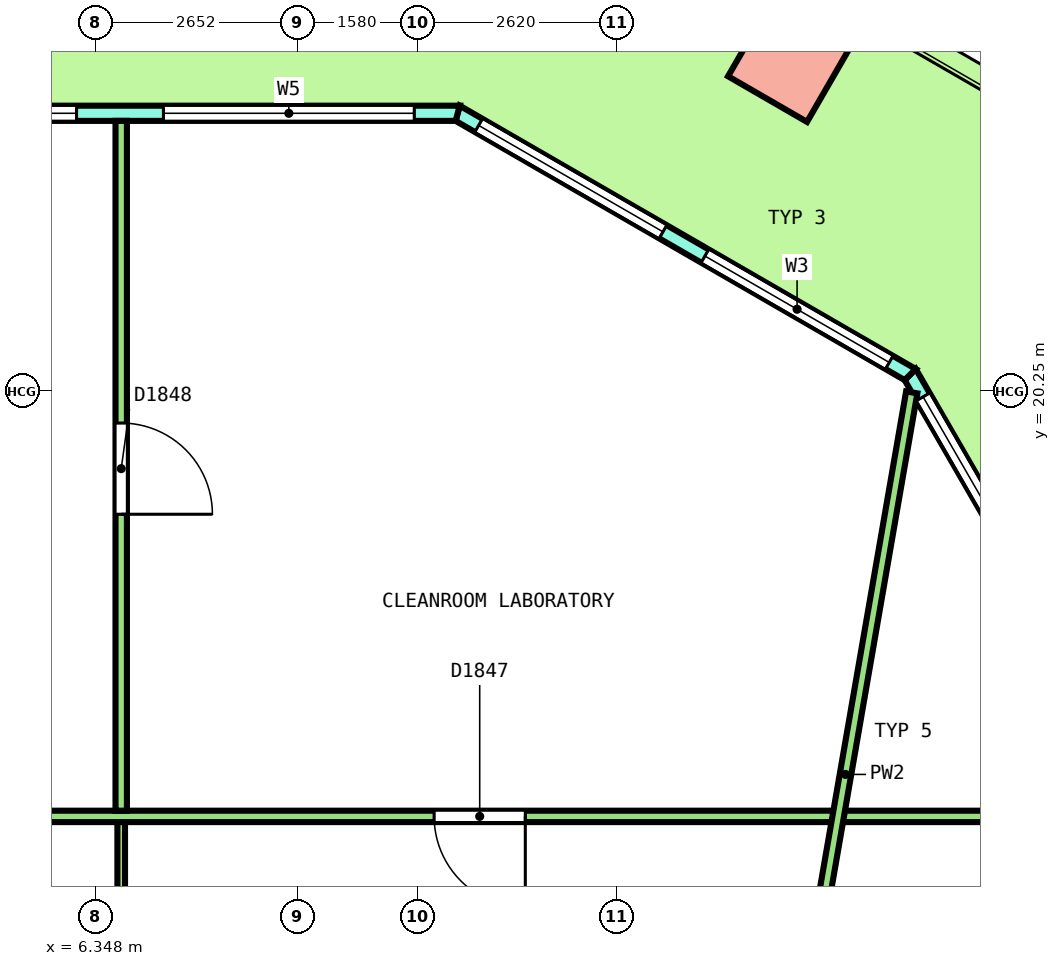
"""IFC4 building model, lengths in metres.
Left out: names, types, materials, properties, quantities, classifications, styles, units other than length and angle.
Written with IfcOpenShell. Run it as: python <this file> out.ifc"""

import sys

from ifc_helpers import new_model, si_unit, direction, frame, frame_2d, origin, origin_2d, place, context, subcontext, project, spatial, polyline, rectangle, outline, extrude, element, fill, save


model = new_model("IFC4")
c1 = context("Model", 3, precision=1e-05, world=origin(), true_north=direction((0.0, 1.0)))
c2 = subcontext(c1, "Body", "Model", "MODEL_VIEW")
j1 = project(units=[si_unit("LENGTHUNIT", "METRE"), si_unit("PLANEANGLEUNIT", "RADIAN")], contexts=[c1])
p1 = place(None, origin())
s1 = spatial("IfcSite", under=j1, at=p1, CompositionType="ELEMENT")
p2 = place(p1, origin())
s2 = spatial("IfcBuilding", under=s1, at=p2, CompositionType="ELEMENT")
p3 = place(p2, frame((0.0, 0.0, 180.4)))
s3 = spatial("IfcBuildingStorey", under=s2, at=p3, CompositionType="ELEMENT", Elevation=180.4)
p4 = place(p3, frame((15.484, 24.606, 0.0), z_axis=(0.036265236264, 0.0, 0.999342199969), x_axis=(-0.865313546461, 0.500246354177, 0.031401456084)))
e1 = element("IfcColumn", 1, at=p4, inside=s3, PredefinedType="COLUMN", context=c2, shape_type="SweptSolid", body=[
    extrude(rectangle(XDim=1.2, YDim=1.2, at=origin_2d()), origin(), (0.0, 0.0, 1.0), 4.053),
])
p5 = place(p3, frame((26.251, 4.543, 0.0), z_axis=(0.0, 0.0, 1.0), x_axis=(-0.499998761798, 0.866026118659, 0.0)))
e2 = element("IfcWall", 2, at=p5, inside=s3, PredefinedType="SOLIDWALL", context=c2, shape_type="SweptSolid", body=[
    extrude(outline(polyline([(-0.027, -0.1), (0.997, -0.1), (2.021, -0.1), (3.046, -0.1), (4.07, -0.1), (5.094, -0.1), (6.118, -0.1), (7.143, -0.1), (8.167, -0.1), (9.191, -0.1), (10.215, -0.1), (11.239, -0.1), (12.263, -0.1), (13.288, -0.1), (14.312, -0.1), (15.336, -0.1), (16.36, -0.1), (17.385, -0.1), (18.409, -0.1), (18.355, 0.1), (17.337, 0.1), (16.319, 0.1), (15.3, 0.1), (14.282, 0.1), (13.264, 0.1), (12.246, 0.1), (11.227, 0.1), (10.209, 0.1), (9.191, 0.1), (8.173, 0.1), (7.155, 0.1), (6.136, 0.1), (5.118, 0.1), (4.1, 0.1), (3.082, 0.1), (2.063, 0.1), (1.045, 0.1), (0.027, 0.1), (-0.027, -0.1)])), origin(), (0.0, 0.0, 1.0), 4.1),
])
p6 = place(p5, frame((0.338, 0.0, 0.1)))
e3 = element("IfcOpeningElement", 3, at=p6, cuts=e2, PredefinedType="OPENING", context=c2, shape_type="SweptSolid", body=[
    extrude(rectangle(XDim=3.0, YDim=2.9, at=frame_2d((1.5, 1.45))), frame((0.0, 0.11, 0.0), z_axis=(0.0, -1.0, 0.0), x_axis=(1.0, 0.0, 0.0)), (0.0, 0.0, 1.0), 0.22),
])
p7 = place(p5, frame((4.015, 0.0, 0.1)))
e4 = element("IfcOpeningElement", 4, at=p7, cuts=e2, PredefinedType="OPENING", context=c2, shape_type="SweptSolid", body=[
    extrude(rectangle(XDim=3.0, YDim=2.9, at=frame_2d((1.5, 1.45))), frame((0.0, 0.11, 0.0), z_axis=(0.0, -1.0, 0.0), x_axis=(1.0, 0.0, 0.0)), (0.0, 0.0, 1.0), 0.22),
])
p8 = place(p5, frame((8.291, 0.0, 0.0)))
e5 = element("IfcOpeningElement", 5, at=p8, cuts=e2, PredefinedType="OPENING", context=c2, shape_type="SweptSolid", body=[
    extrude(rectangle(XDim=1.8, YDim=2.4, at=frame_2d((0.9, 1.2))), frame((0.0, 0.11, 0.0), z_axis=(0.0, -1.0, 0.0), x_axis=(1.0, 0.0, 0.0)), (0.0, 0.0, 1.0), 0.22),
])
p9 = place(p5, frame((8.291, 0.0, 2.55)))
e6 = element("IfcOpeningElement", 6, at=p9, cuts=e2, PredefinedType="OPENING", context=c2, shape_type="SweptSolid", body=[
    extrude(rectangle(XDim=1.8, YDim=0.45, at=frame_2d((0.9, 0.225))), frame((0.0, 0.11, 0.0), z_axis=(0.0, -1.0, 0.0), x_axis=(1.0, 0.0, 0.0)), (0.0, 0.0, 1.0), 0.22),
])
p10 = place(p5, frame((11.367, 0.0, 0.1)))
e7 = element("IfcOpeningElement", 7, at=p10, cuts=e2, PredefinedType="OPENING", context=c2, shape_type="SweptSolid", body=[
    extrude(rectangle(XDim=3.0, YDim=2.9, at=frame_2d((1.5, 1.45))), frame((0.0, 0.11, 0.0), z_axis=(0.0, -1.0, 0.0), x_axis=(1.0, 0.0, 0.0)), (0.0, 0.0, 1.0), 0.22),
])
p11 = place(p5, frame((15.044, 0.0, 0.1)))
e8 = element("IfcOpeningElement", 8, at=p11, cuts=e2, PredefinedType="OPENING", context=c2, shape_type="SweptSolid", body=[
    extrude(rectangle(XDim=3.0, YDim=2.9, at=frame_2d((1.5, 1.45))), frame((0.0, 0.11, 0.0), z_axis=(0.0, -1.0, 0.0), x_axis=(1.0, 0.0, 0.0)), (0.0, 0.0, 1.0), 0.22),
])
p12 = place(p3, frame((17.061, 20.463, 0.0), z_axis=(0.0, 0.0, 1.0), x_axis=(-0.866029458321, 0.49999297727, 0.0)))
e9 = element("IfcWall", 9, at=p12, inside=s3, PredefinedType="SOLIDWALL", context=c2, shape_type="SweptSolid", body=[
    extrude(outline(polyline([(-0.027, -0.1), (1.128, -0.1), (2.282, -0.1), (3.437, -0.1), (4.592, -0.1), (5.747, -0.1), (6.901, -0.1), (6.848, 0.1), (5.711, 0.1), (4.574, 0.1), (3.437, 0.1), (2.301, 0.1), (1.164, 0.1), (0.027, 0.1), (-0.027, -0.1)])), origin(), (0.0, 0.0, 1.0), 4.1),
])
p13 = place(p12, frame((0.319, 0.0, 0.1)))
e10 = element("IfcOpeningElement", 10, at=p13, cuts=e9, PredefinedType="OPENING", context=c2, shape_type="SweptSolid", body=[
    extrude(rectangle(XDim=2.8, YDim=2.9, at=frame_2d((1.4, 1.45))), frame((0.0, 0.11, 0.0), z_axis=(0.0, -1.0, 0.0), x_axis=(1.0, 0.0, 0.0)), (0.0, 0.0, 1.0), 0.22),
])
p14 = place(p12, frame((3.756, 0.0, 0.1)))
e11 = element("IfcOpeningElement", 11, at=p14, cuts=e9, PredefinedType="OPENING", context=c2, shape_type="SweptSolid", body=[
    extrude(rectangle(XDim=2.8, YDim=2.9, at=frame_2d((1.4, 1.45))), frame((0.0, 0.11, 0.0), z_axis=(0.0, -1.0, 0.0), x_axis=(1.0, 0.0, 0.0)), (0.0, 0.0, 1.0), 0.22),
])
p15 = place(p3, frame((11.107, 23.9, 0.0), z_axis=(0.0, 0.0, 1.0), x_axis=(-1.0, 0.0, 0.0)))
e12 = element("IfcWall", 12, at=p15, inside=s3, PredefinedType="SOLIDWALL", context=c2, shape_type="SweptSolid", body=[
    extrude(outline(polyline([(-0.027, -0.1), (0.985, -0.1), (1.998, -0.1), (3.01, -0.1), (4.022, -0.1), (5.034, -0.1), (6.046, -0.1), (7.058, -0.1), (8.071, -0.1), (9.083, -0.1), (10.095, -0.1), (11.107, -0.1), (12.119, -0.1), (13.131, -0.1), (14.143, -0.1), (15.156, -0.1), (16.168, -0.1), (17.18, -0.1), (18.192, -0.1), (19.204, -0.1), (20.216, -0.1), (21.229, -0.1), (22.241, -0.1), (22.187, 0.1), (21.18, 0.1), (20.172, 0.1), (19.165, 0.1), (18.158, 0.1), (17.151, 0.1), (16.143, 0.1), (15.136, 0.1), (14.129, 0.1), (13.122, 0.1), (12.114, 0.1), (11.107, 0.1), (10.1, 0.1), (9.092, 0.1), (8.085, 0.1), (7.078, 0.1), (6.071, 0.1), (5.063, 0.1), (4.056, 0.1), (3.049, 0.1), (2.042, 0.1), (1.034, 0.1), (0.027, 0.1), (-0.027, -0.1)])), origin(), (0.0, 0.0, 1.0), 4.1),
])
p16 = place(p15, frame((0.571, 0.0, 0.1)))
e13 = element("IfcOpeningElement", 13, at=p16, cuts=e12, PredefinedType="OPENING", context=c2, shape_type="SweptSolid", body=[
    extrude(rectangle(XDim=3.3, YDim=2.9, at=frame_2d((1.65, 1.45))), frame((0.0, 0.11, 0.0), z_axis=(0.0, -1.0, 0.0), x_axis=(1.0, 0.0, 0.0)), (0.0, 0.0, 1.0), 0.22),
])
p17 = place(p15, frame((5.014, 0.0, 0.1)))
e14 = element("IfcOpeningElement", 14, at=p17, cuts=e12, PredefinedType="OPENING", context=c2, shape_type="SweptSolid", body=[
    extrude(rectangle(XDim=3.3, YDim=2.9, at=frame_2d((1.65, 1.45))), frame((0.0, 0.11, 0.0), z_axis=(0.0, -1.0, 0.0), x_axis=(1.0, 0.0, 0.0)), (0.0, 0.0, 1.0), 0.22),
])
p18 = place(p15, frame((10.207, 0.0, 0.0)))
e15 = element("IfcOpeningElement", 15, at=p18, cuts=e12, PredefinedType="OPENING", context=c2, shape_type="SweptSolid", body=[
    extrude(rectangle(XDim=1.8, YDim=2.4, at=frame_2d((0.9, 1.2))), frame((0.0, 0.11, 0.0), z_axis=(0.0, -1.0, 0.0), x_axis=(1.0, 0.0, 0.0)), (0.0, 0.0, 1.0), 0.22),
])
p19 = place(p15, frame((10.207, 0.0, 2.55)))
e16 = element("IfcOpeningElement", 16, at=p19, cuts=e12, PredefinedType="OPENING", context=c2, shape_type="SweptSolid", body=[
    extrude(rectangle(XDim=1.8, YDim=0.45, at=frame_2d((0.9, 0.225))), frame((0.0, 0.11, 0.0), z_axis=(0.0, -1.0, 0.0), x_axis=(1.0, 0.0, 0.0)), (0.0, 0.0, 1.0), 0.22),
])
p20 = place(p15, frame((13.9, 0.0, 0.1)))
e17 = element("IfcOpeningElement", 17, at=p20, cuts=e12, PredefinedType="OPENING", context=c2, shape_type="SweptSolid", body=[
    extrude(rectangle(XDim=3.3, YDim=2.9, at=frame_2d((1.65, 1.45))), frame((0.0, 0.11, 0.0), z_axis=(0.0, -1.0, 0.0), x_axis=(1.0, 0.0, 0.0)), (0.0, 0.0, 1.0), 0.22),
])
p21 = place(p15, frame((18.343, 0.0, 0.1)))
e18 = element("IfcOpeningElement", 18, at=p21, cuts=e12, PredefinedType="OPENING", context=c2, shape_type="SweptSolid", body=[
    extrude(rectangle(XDim=3.3, YDim=2.9, at=frame_2d((1.65, 1.45))), frame((0.0, 0.11, 0.0), z_axis=(0.0, -1.0, 0.0), x_axis=(1.0, 0.0, 0.0)), (0.0, 0.0, 1.0), 0.22),
])
p22 = place(p3, frame((-19.675, 14.65, 0.0), z_axis=(0.0, 0.0, 1.0), x_axis=(1.0, 0.0, 0.0)))
e19 = element("IfcWall", 19, at=p22, inside=s3, PredefinedType="PARTITIONING", context=c2, shape_type="SweptSolid", body=[
    extrude(rectangle(XDim=39.5, YDim=0.15, at=frame_2d((19.75, 0.0))), origin(), (0.0, 0.0, 1.0), 3.05),
])
p23 = place(p22, frame((30.472, 0.0, 0.0)))
e20 = element("IfcOpeningElement", 20, at=p23, cuts=e19, PredefinedType="OPENING", context=c2, shape_type="SweptSolid", body=[
    extrude(rectangle(XDim=1.2, YDim=2.1, at=frame_2d((0.6, 1.05))), frame((0.0, 0.085, 0.0), z_axis=(0.0, -1.0, 0.0), x_axis=(1.0, 0.0, 0.0)), (0.0, 0.0, 1.0), 0.17),
])
p24 = place(p3, frame((15.337, 10.176, 0.0), z_axis=(0.0, 0.0, 1.0), x_axis=(0.170860446067, 0.985295238987, 0.0)))
e21 = element("IfcWall", 21, at=p24, inside=s3, PredefinedType="PARTITIONING", context=c2, shape_type="SweptSolid", body=[
    extrude(rectangle(XDim=10.202, YDim=0.15, at=frame_2d((5.101, 0.0))), origin(), (0.0, 0.0, 1.0), 3.05),
])
p25 = place(p3, frame((6.68, 14.725, 0.0), z_axis=(0.0, 0.0, 1.0), x_axis=(0.0, 1.0, 0.0)))
e22 = element("IfcWall", 22, at=p25, inside=s3, PredefinedType="PARTITIONING", context=c2, shape_type="SweptSolid", body=[
    extrude(rectangle(XDim=9.075, YDim=0.15, at=frame_2d((4.538, 0.0))), origin(), (0.0, 0.0, 1.0), 3.05),
])
p26 = place(p25, frame((3.9, 0.0, 0.0)))
e23 = element("IfcOpeningElement", 23, at=p26, cuts=e22, PredefinedType="OPENING", context=c2, shape_type="SweptSolid", body=[
    extrude(rectangle(XDim=1.2, YDim=2.1, at=frame_2d((0.6, 1.05))), frame((0.0, 0.085, 0.0), z_axis=(0.0, -1.0, 0.0), x_axis=(1.0, 0.0, 0.0)), (0.0, 0.0, 1.0), 0.17),
])
p27 = place(p3, frame((6.68, 10.325, 0.0), z_axis=(0.0, 0.0, 1.0), x_axis=(0.0, 1.0, 0.0)))
e24 = element("IfcWall", 24, at=p27, inside=s3, PredefinedType="PARTITIONING", context=c2, shape_type="SweptSolid", body=[
    extrude(rectangle(XDim=4.25, YDim=0.1, at=frame_2d((2.125, 0.0))), origin(), (0.0, 0.0, 1.0), 3.05),
])
p28 = place(p11, origin())
e25 = element("IfcWindow", 25, at=p28, inside=s3, PartitioningType="SINGLE_PANEL", PredefinedType="WINDOW", context=c2, shape_type="SweptSolid", body=[
    extrude(rectangle(XDim=3.0, YDim=2.9, at=frame_2d((1.5, 1.45))), frame((0.0, 0.03, 0.0), z_axis=(0.0, -1.0, 0.0), x_axis=(1.0, 0.0, 0.0)), (0.0, 0.0, 1.0), 0.06),
])
fill(e8, e25)
p29 = place(p13, origin())
e26 = element("IfcWindow", 26, at=p29, inside=s3, PartitioningType="SINGLE_PANEL", PredefinedType="WINDOW", context=c2, shape_type="SweptSolid", body=[
    extrude(rectangle(XDim=2.8, YDim=2.9, at=frame_2d((1.4, 1.45))), frame((0.0, 0.03, 0.0), z_axis=(0.0, -1.0, 0.0), x_axis=(1.0, 0.0, 0.0)), (0.0, 0.0, 1.0), 0.06),
])
fill(e10, e26)
p30 = place(p14, origin())
e27 = element("IfcWindow", 27, at=p30, inside=s3, PartitioningType="SINGLE_PANEL", PredefinedType="WINDOW", context=c2, shape_type="SweptSolid", body=[
    extrude(rectangle(XDim=2.8, YDim=2.9, at=frame_2d((1.4, 1.45))), frame((0.0, 0.03, 0.0), z_axis=(0.0, -1.0, 0.0), x_axis=(1.0, 0.0, 0.0)), (0.0, 0.0, 1.0), 0.06),
])
fill(e11, e27)
p31 = place(p16, origin())
e28 = element("IfcWindow", 28, at=p31, inside=s3, PartitioningType="SINGLE_PANEL", PredefinedType="WINDOW", context=c2, shape_type="SweptSolid", body=[
    extrude(rectangle(XDim=3.3, YDim=2.9, at=frame_2d((1.65, 1.45))), frame((0.0, 0.03, 0.0), z_axis=(0.0, -1.0, 0.0), x_axis=(1.0, 0.0, 0.0)), (0.0, 0.0, 1.0), 0.06),
])
fill(e13, e28)
p32 = place(p17, origin())
e29 = element("IfcWindow", 29, at=p32, inside=s3, PartitioningType="SINGLE_PANEL", PredefinedType="WINDOW", context=c2, shape_type="SweptSolid", body=[
    extrude(rectangle(XDim=3.3, YDim=2.9, at=frame_2d((1.65, 1.45))), frame((0.0, 0.03, 0.0), z_axis=(0.0, -1.0, 0.0), x_axis=(1.0, 0.0, 0.0)), (0.0, 0.0, 1.0), 0.06),
])
fill(e14, e29)
p33 = place(p23, origin())
e30 = element("IfcDoor", 30, at=p33, inside=s3, OperationType="DOUBLE_DOOR_SINGLE_SWING", PredefinedType="DOOR", context=c2, shape_type="SweptSolid", body=[
    extrude(rectangle(XDim=1.2, YDim=2.1, at=frame_2d((0.6, 1.05))), frame((0.0, 0.025, 0.0), z_axis=(0.0, -1.0, 0.0), x_axis=(1.0, 0.0, 0.0)), (0.0, 0.0, 1.0), 0.05),
])
fill(e20, e30)
p34 = place(p26, origin())
e31 = element("IfcDoor", 31, at=p34, inside=s3, OperationType="DOUBLE_DOOR_SINGLE_SWING", PredefinedType="DOOR", context=c2, shape_type="SweptSolid", body=[
    extrude(rectangle(XDim=1.2, YDim=2.1, at=frame_2d((0.6, 1.05))), frame((0.0, 0.025, 0.0), z_axis=(0.0, -1.0, 0.0), x_axis=(1.0, 0.0, 0.0)), (0.0, 0.0, 1.0), 0.05),
])
fill(e23, e31)
save(model, sys.argv[1])
